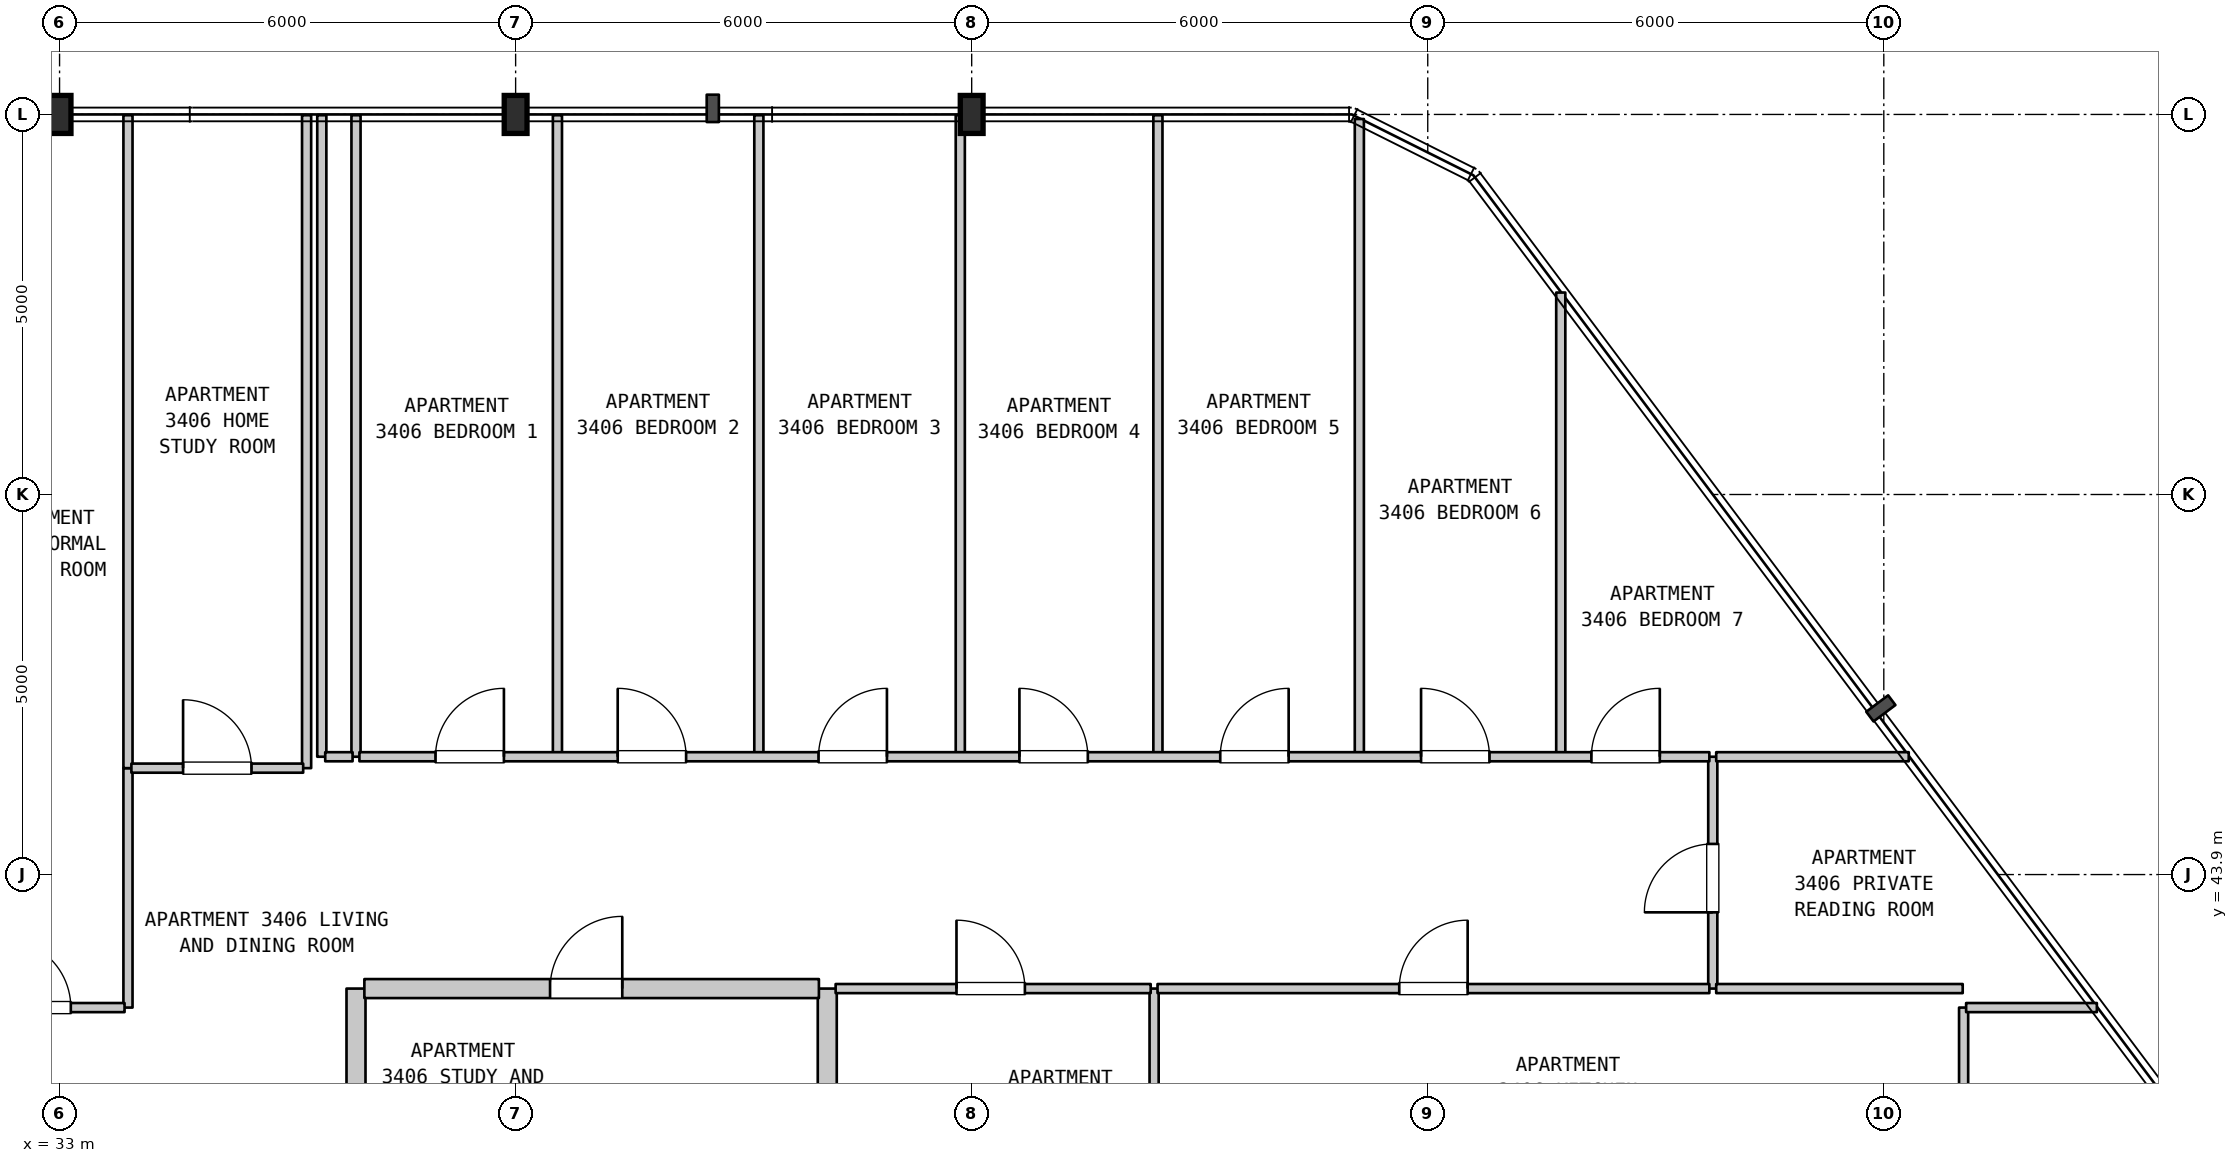
"""IFC4 building model, lengths in metres.
Left out: names, types, materials, properties, quantities, classifications, styles, units other than length and angle.
Written with IfcOpenShell. Run it as: python <this file> out.ifc"""

import sys

from ifc_helpers import new_model, si_unit, direction, frame, frame_2d, origin, origin_2d, place, context, subcontext, project, spatial, rectangle, i_section, extrude, element, fill, save


model = new_model("IFC4")
c1 = context("Model", 3, precision=1e-05, world=origin(), true_north=direction((0.0, 1.0)))
c2 = subcontext(c1, "Body", "Model", "MODEL_VIEW")
j1 = project(units=[si_unit("LENGTHUNIT", "METRE"), si_unit("PLANEANGLEUNIT", "RADIAN")], contexts=[c1])
p1 = place(None, origin())
s1 = spatial("IfcSite", under=j1, at=p1, CompositionType="ELEMENT")
p2 = place(p1, origin())
s2 = spatial("IfcBuilding", under=s1, at=p2, CompositionType="ELEMENT")
p3 = place(p2, frame((0.0, 0.0, 140.9)))
s3 = spatial("IfcBuildingStorey", under=s2, at=p3, CompositionType="ELEMENT", Elevation=140.9)
for number, where, z_axis, x_axis in (
    (1, (33.0, 53.9, 0.0), (0.0, 0.0, 1.0), (1.0, 0.0, 0.0)),
    (2, (39.0, 53.9, 0.0), (0.0, 0.0, 1.0), (1.0, 0.0, 0.0)),
    (3, (45.0, 53.9, 0.0), (0.0, 0.0, 1.0), (1.0, 0.0, 0.0)),
):
    element("IfcColumn", number, at=place(p3, frame(where, z_axis=z_axis, x_axis=x_axis)), inside=s3, PredefinedType="COLUMN", context=c2, shape_type="SweptSolid", body=[
        extrude(i_section(OverallWidth=0.3, OverallDepth=0.5, WebThickness=0.014, FlangeThickness=0.028, FilletRadius=0.027, at=origin_2d()), origin(), (0.0, 0.0, 1.0), 3.7),
    ])
p4 = place(p3, frame((33.9, 42.15, 0.0), z_axis=(0.0, 0.0, 1.0), x_axis=(0.0, 1.0, 0.0)))
e4 = element("IfcWall", 4, at=p4, inside=s3, PredefinedType="PARTITIONING", context=c2, shape_type="SweptSolid", body=[
    extrude(rectangle(XDim=3.15, YDim=0.12, at=frame_2d((1.575, 0.0))), origin(), (0.0, 0.0, 1.0), 3.385),
])
for number, where, z_axis, x_axis in (
    (5, (33.9, 45.3, 0.0), (0.0, 0.0, 1.0), (0.0, 1.0, 0.0)),
    (6, (36.25, 45.3, 0.0), (0.0, 0.0, 1.0), (0.0, 1.0, 0.0)),
):
    element("IfcWall", number, at=place(p3, frame(where, z_axis=z_axis, x_axis=x_axis)), inside=s3, PredefinedType="PARTITIONING", context=c2, shape_type="SweptSolid", body=[
        extrude(rectangle(XDim=8.59, YDim=0.12, at=frame_2d((4.295, 0.0))), origin(), (0.0, 0.0, 1.0), 3.385),
    ])
p5 = place(p3, frame((36.45, 45.45, 0.0), z_axis=(0.0, 0.0, 1.0), x_axis=(0.0, 1.0, 0.0)))
e7 = element("IfcWall", 7, at=p5, inside=s3, PredefinedType="PARTITIONING", context=c2, shape_type="SweptSolid", body=[
    extrude(rectangle(XDim=8.44, YDim=0.12, at=frame_2d((4.22, 0.0))), origin(), (0.0, 0.0, 1.0), 3.385),
])
p6 = place(p3, frame((36.9, 40.1, 0.0), z_axis=(0.0, 0.0, 1.0), x_axis=(0.0, 1.0, 0.0)))
e8 = element("IfcWall", 8, at=p6, inside=s3, PredefinedType="STANDARD", context=c2, shape_type="SweptSolid", body=[
    extrude(rectangle(XDim=2.3, YDim=0.25, at=frame_2d((1.15, 0.0))), origin(), (0.0, 0.0, 1.0), 3.385),
])
for number, where, z_axis, x_axis in (
    (9, (36.9, 45.45, 0.0), (0.0, 0.0, 1.0), (0.0, 1.0, 0.0)),
    (10, (39.55, 45.45, 0.0), (0.0, 0.0, 1.0), (0.0, 1.0, 0.0)),
    (11, (42.2, 45.45, 0.0), (0.0, 0.0, 1.0), (0.0, 1.0, 0.0)),
):
    element("IfcWall", number, at=place(p3, frame(where, z_axis=z_axis, x_axis=x_axis)), inside=s3, PredefinedType="PARTITIONING", context=c2, shape_type="SweptSolid", body=[
        extrude(rectangle(XDim=8.44, YDim=0.12, at=frame_2d((4.22, 0.0))), origin(), (0.0, 0.0, 1.0), 3.385),
    ])
p7 = place(p3, frame((43.1, 40.1, 0.0), z_axis=(0.0, 0.0, 1.0), x_axis=(0.0, 1.0, 0.0)))
e12 = element("IfcWall", 12, at=p7, inside=s3, PredefinedType="STANDARD", context=c2, shape_type="SweptSolid", body=[
    extrude(rectangle(XDim=2.3, YDim=0.25, at=frame_2d((1.15, 0.0))), origin(), (0.0, 0.0, 1.0), 3.385),
])
p8 = place(p3, frame((44.85, 45.45, 0.0), z_axis=(0.0, 0.0, 1.0), x_axis=(0.0, 1.0, 0.0)))
e13 = element("IfcWall", 13, at=p8, inside=s3, PredefinedType="PARTITIONING", context=c2, shape_type="SweptSolid", body=[
    extrude(rectangle(XDim=8.44, YDim=0.12, at=frame_2d((4.22, 0.0))), origin(), (0.0, 0.0, 1.0), 3.385),
])
p9 = place(p3, frame((47.4, 40.1, 0.0), z_axis=(0.0, 0.0, 1.0), x_axis=(0.0, 1.0, 0.0)))
e14 = element("IfcWall", 14, at=p9, inside=s3, PredefinedType="PARTITIONING", context=c2, shape_type="SweptSolid", body=[
    extrude(rectangle(XDim=2.3, YDim=0.12, at=frame_2d((1.15, 0.0))), origin(), (0.0, 0.0, 1.0), 3.385),
])
p10 = place(p3, frame((47.45, 45.45, 0.0), z_axis=(0.0, 0.0, 1.0), x_axis=(0.0, 1.0, 0.0)))
e15 = element("IfcWall", 15, at=p10, inside=s3, PredefinedType="PARTITIONING", context=c2, shape_type="SweptSolid", body=[
    extrude(rectangle(XDim=8.44, YDim=0.12, at=frame_2d((4.22, 0.0))), origin(), (0.0, 0.0, 1.0), 3.385),
])
p11 = place(p3, frame((50.1, 45.45, 0.0), z_axis=(0.0, 0.0, 1.0), x_axis=(0.0, 1.0, 0.0)))
e16 = element("IfcWall", 16, at=p11, inside=s3, PredefinedType="PARTITIONING", context=c2, shape_type="SweptSolid", body=[
    extrude(rectangle(XDim=8.39, YDim=0.12, at=frame_2d((4.195, 0.0))), origin(), (0.0, 0.0, 1.0), 3.385),
])
p12 = place(p3, frame((52.75, 45.45, 0.0), z_axis=(0.0, 0.0, 1.0), x_axis=(0.0, 1.0, 0.0)))
e17 = element("IfcWall", 17, at=p12, inside=s3, PredefinedType="PARTITIONING", context=c2, shape_type="SweptSolid", body=[
    extrude(rectangle(XDim=6.107, YDim=0.12, at=frame_2d((3.053, 0.0))), origin(), (0.0, 0.0, 1.0), 3.385),
])
p13 = place(p3, frame((54.75, 42.4, 0.0), z_axis=(0.0, 0.0, 1.0), x_axis=(0.0, 1.0, 0.0)))
e18 = element("IfcWall", 18, at=p13, inside=s3, PredefinedType="PARTITIONING", context=c2, shape_type="SweptSolid", body=[
    extrude(rectangle(XDim=3.05, YDim=0.12, at=frame_2d((1.525, 0.0))), origin(), (0.0, 0.0, 1.0), 3.385),
])
p14 = place(p13, frame((1.003, 0.0, 0.0)))
e19 = element("IfcOpeningElement", 19, at=p14, cuts=e18, PredefinedType="OPENING", context=c2, shape_type="SweptSolid", body=[
    extrude(rectangle(XDim=0.9, YDim=2.15, at=frame_2d((0.45, 1.075))), frame((0.0, 0.07, 0.0), z_axis=(0.0, -1.0, 0.0), x_axis=(1.0, 0.0, 0.0)), (0.0, 0.0, 1.0), 0.14),
])
p15 = place(p3, frame((58.05, 40.1, 0.0), z_axis=(0.0, 0.0, 1.0), x_axis=(0.0, 1.0, 0.0)))
e20 = element("IfcWall", 20, at=p15, inside=s3, PredefinedType="PARTITIONING", context=c2, shape_type="SweptSolid", body=[
    extrude(rectangle(XDim=2.05, YDim=0.12, at=frame_2d((1.025, 0.0))), origin(), (0.0, 0.0, 1.0), 3.385),
])
p16 = place(p3, frame((31.695, 42.15, 0.0), z_axis=(0.0, 0.0, 1.0), x_axis=(1.0, 0.0, 0.0)))
e21 = element("IfcWall", 21, at=p16, inside=s3, PredefinedType="PARTITIONING", context=c2, shape_type="SweptSolid", body=[
    extrude(rectangle(XDim=2.16, YDim=0.12, at=frame_2d((1.08, 0.0))), origin(), (0.0, 0.0, 1.0), 3.385),
])
p17 = place(p16, frame((0.553, 0.0, 0.0)))
e22 = element("IfcOpeningElement", 22, at=p17, cuts=e21, PredefinedType="OPENING", context=c2, shape_type="SweptSolid", body=[
    extrude(rectangle(XDim=0.9, YDim=2.15, at=frame_2d((0.45, 1.075))), frame((0.0, 0.07, 0.0), z_axis=(0.0, -1.0, 0.0), x_axis=(1.0, 0.0, 0.0)), (0.0, 0.0, 1.0), 0.14),
])
p18 = place(p3, frame((58.083, 42.15, 0.0), z_axis=(0.0, 0.0, 1.0), x_axis=(1.0, 0.0, 0.0)))
e23 = element("IfcWall", 23, at=p18, inside=s3, PredefinedType="PARTITIONING", context=c2, shape_type="SweptSolid", body=[
    extrude(rectangle(XDim=1.72, YDim=0.12, at=frame_2d((0.86, 0.0))), origin(), (0.0, 0.0, 1.0), 3.385),
])
p19 = place(p3, frame((37.01, 42.4, 0.0), z_axis=(0.0, 0.0, 1.0), x_axis=(1.0, 0.0, 0.0)))
e24 = element("IfcWall", 24, at=p19, inside=s3, PredefinedType="STANDARD", context=c2, shape_type="SweptSolid", body=[
    extrude(rectangle(XDim=5.98, YDim=0.25, at=frame_2d((2.99, 0.0))), origin(), (0.0, 0.0, 1.0), 3.385),
])
p20 = place(p19, frame((2.443, 0.0, 0.0)))
e25 = element("IfcOpeningElement", 25, at=p20, cuts=e24, PredefinedType="OPENING", context=c2, shape_type="SweptSolid", body=[
    extrude(rectangle(XDim=0.95, YDim=2.15, at=frame_2d((0.475, 1.075))), frame((0.0, 0.135, 0.0), z_axis=(0.0, -1.0, 0.0), x_axis=(1.0, 0.0, 0.0)), (0.0, 0.0, 1.0), 0.27),
])
p21 = place(p3, frame((43.21, 42.4, 0.0), z_axis=(0.0, 0.0, 1.0), x_axis=(1.0, 0.0, 0.0)))
e26 = element("IfcWall", 26, at=p21, inside=s3, PredefinedType="PARTITIONING", context=c2, shape_type="SweptSolid", body=[
    extrude(rectangle(XDim=4.145, YDim=0.12, at=frame_2d((2.073, 0.0))), origin(), (0.0, 0.0, 1.0), 3.385),
])
p22 = place(p21, frame((1.59, 0.0, 0.0)))
e27 = element("IfcOpeningElement", 27, at=p22, cuts=e26, PredefinedType="OPENING", context=c2, shape_type="SweptSolid", body=[
    extrude(rectangle(XDim=0.9, YDim=2.1, at=frame_2d((0.45, 1.05))), frame((0.0, 0.07, 0.0), z_axis=(0.0, -1.0, 0.0), x_axis=(1.0, 0.0, 0.0)), (0.0, 0.0, 1.0), 0.14),
])
p23 = place(p3, frame((47.445, 42.4, 0.0), z_axis=(0.0, 0.0, 1.0), x_axis=(1.0, 0.0, 0.0)))
e28 = element("IfcWall", 28, at=p23, inside=s3, PredefinedType="PARTITIONING", context=c2, shape_type="SweptSolid", body=[
    extrude(rectangle(XDim=7.26, YDim=0.12, at=frame_2d((3.63, 0.0))), origin(), (0.0, 0.0, 1.0), 3.385),
])
p24 = place(p23, frame((3.18, 0.0, 0.0)))
e29 = element("IfcOpeningElement", 29, at=p24, cuts=e28, PredefinedType="OPENING", context=c2, shape_type="SweptSolid", body=[
    extrude(rectangle(XDim=0.9, YDim=2.15, at=frame_2d((0.45, 1.075))), frame((0.0, 0.07, 0.0), z_axis=(0.0, -1.0, 0.0), x_axis=(1.0, 0.0, 0.0)), (0.0, 0.0, 1.0), 0.14),
])
p25 = place(p3, frame((54.795, 42.4, 0.0), z_axis=(0.0, 0.0, 1.0), x_axis=(1.0, 0.0, 0.0)))
e30 = element("IfcWall", 30, at=p25, inside=s3, PredefinedType="PARTITIONING", context=c2, shape_type="SweptSolid", body=[
    extrude(rectangle(XDim=3.243, YDim=0.12, at=frame_2d((1.622, 0.0))), origin(), (0.0, 0.0, 1.0), 3.385),
])
p26 = place(p3, frame((33.945, 45.3, 0.0), z_axis=(0.0, 0.0, 1.0), x_axis=(1.0, 0.0, 0.0)))
e31 = element("IfcWall", 31, at=p26, inside=s3, PredefinedType="PARTITIONING", context=c2, shape_type="SweptSolid", body=[
    extrude(rectangle(XDim=2.26, YDim=0.12, at=frame_2d((1.13, 0.0))), origin(), (0.0, 0.0, 1.0), 3.385),
])
p27 = place(p26, frame((0.68, 0.0, 0.0)))
e32 = element("IfcOpeningElement", 32, at=p27, cuts=e31, PredefinedType="OPENING", context=c2, shape_type="SweptSolid", body=[
    extrude(rectangle(XDim=0.9, YDim=2.15, at=frame_2d((0.45, 1.075))), frame((0.0, 0.07, 0.0), z_axis=(0.0, -1.0, 0.0), x_axis=(1.0, 0.0, 0.0)), (0.0, 0.0, 1.0), 0.14),
])
p28 = place(p3, frame((36.495, 45.45, 0.0), z_axis=(0.0, 0.0, 1.0), x_axis=(1.0, 0.0, 0.0)))
e33 = element("IfcWall", 33, at=p28, inside=s3, PredefinedType="PARTITIONING", context=c2, shape_type="SweptSolid", body=[
    extrude(rectangle(XDim=0.36, YDim=0.12, at=frame_2d((0.18, 0.0))), origin(), (0.0, 0.0, 1.0), 3.385),
])
p29 = place(p3, frame((36.945, 45.45, 0.0), z_axis=(0.0, 0.0, 1.0), x_axis=(1.0, 0.0, 0.0)))
e34 = element("IfcWall", 34, at=p29, inside=s3, PredefinedType="PARTITIONING", context=c2, shape_type="SweptSolid", body=[
    extrude(rectangle(XDim=17.76, YDim=0.12, at=frame_2d((8.88, 0.0))), origin(), (0.0, 0.0, 1.0), 3.385),
])
p30 = place(p29, frame((1.001, 0.0, 0.0)))
e35 = element("IfcOpeningElement", 35, at=p30, cuts=e34, PredefinedType="OPENING", context=c2, shape_type="SweptSolid", body=[
    extrude(rectangle(XDim=0.9, YDim=2.15, at=frame_2d((0.45, 1.075))), frame((0.0, 0.07, 0.0), z_axis=(0.0, -1.0, 0.0), x_axis=(1.0, 0.0, 0.0)), (0.0, 0.0, 1.0), 0.14),
])
p31 = place(p29, frame((3.398, 0.0, 0.0)))
e36 = element("IfcOpeningElement", 36, at=p31, cuts=e34, PredefinedType="OPENING", context=c2, shape_type="SweptSolid", body=[
    extrude(rectangle(XDim=0.9, YDim=2.15, at=frame_2d((0.45, 1.075))), frame((0.0, 0.07, 0.0), z_axis=(0.0, -1.0, 0.0), x_axis=(1.0, 0.0, 0.0)), (0.0, 0.0, 1.0), 0.14),
])
p32 = place(p29, frame((6.04, 0.0, 0.0)))
e37 = element("IfcOpeningElement", 37, at=p32, cuts=e34, PredefinedType="OPENING", context=c2, shape_type="SweptSolid", body=[
    extrude(rectangle(XDim=0.9, YDim=2.15, at=frame_2d((0.45, 1.075))), frame((0.0, 0.07, 0.0), z_axis=(0.0, -1.0, 0.0), x_axis=(1.0, 0.0, 0.0)), (0.0, 0.0, 1.0), 0.14),
])
p33 = place(p29, frame((8.683, 0.0, 0.0)))
e38 = element("IfcOpeningElement", 38, at=p33, cuts=e34, PredefinedType="OPENING", context=c2, shape_type="SweptSolid", body=[
    extrude(rectangle(XDim=0.9, YDim=2.15, at=frame_2d((0.45, 1.075))), frame((0.0, 0.07, 0.0), z_axis=(0.0, -1.0, 0.0), x_axis=(1.0, 0.0, 0.0)), (0.0, 0.0, 1.0), 0.14),
])
p34 = place(p29, frame((11.325, 0.0, 0.0)))
e39 = element("IfcOpeningElement", 39, at=p34, cuts=e34, PredefinedType="OPENING", context=c2, shape_type="SweptSolid", body=[
    extrude(rectangle(XDim=0.9, YDim=2.15, at=frame_2d((0.45, 1.075))), frame((0.0, 0.07, 0.0), z_axis=(0.0, -1.0, 0.0), x_axis=(1.0, 0.0, 0.0)), (0.0, 0.0, 1.0), 0.14),
])
p35 = place(p29, frame((13.967, 0.0, 0.0)))
e40 = element("IfcOpeningElement", 40, at=p35, cuts=e34, PredefinedType="OPENING", context=c2, shape_type="SweptSolid", body=[
    extrude(rectangle(XDim=0.9, YDim=2.15, at=frame_2d((0.45, 1.075))), frame((0.0, 0.07, 0.0), z_axis=(0.0, -1.0, 0.0), x_axis=(1.0, 0.0, 0.0)), (0.0, 0.0, 1.0), 0.14),
])
p36 = place(p29, frame((16.208, 0.0, 0.0)))
e41 = element("IfcOpeningElement", 41, at=p36, cuts=e34, PredefinedType="OPENING", context=c2, shape_type="SweptSolid", body=[
    extrude(rectangle(XDim=0.9, YDim=2.15, at=frame_2d((0.45, 1.075))), frame((0.0, 0.07, 0.0), z_axis=(0.0, -1.0, 0.0), x_axis=(1.0, 0.0, 0.0)), (0.0, 0.0, 1.0), 0.14),
])
p37 = place(p3, frame((54.795, 45.45, 0.0), z_axis=(0.0, 0.0, 1.0), x_axis=(1.0, 0.0, 0.0)))
e42 = element("IfcWall", 42, at=p37, inside=s3, PredefinedType="PARTITIONING", context=c2, shape_type="SweptSolid", body=[
    extrude(rectangle(XDim=2.533, YDim=0.12, at=frame_2d((1.267, 0.0))), origin(), (0.0, 0.0, 1.0), 3.385),
])
p38 = place(p14, origin())
e43 = element("IfcDoor", 43, at=p38, inside=s3, OperationType="SINGLE_SWING_LEFT", PredefinedType="DOOR", context=c2, shape_type="SweptSolid", body=[
    extrude(rectangle(XDim=0.9, YDim=2.15, at=frame_2d((0.45, 1.075))), frame((0.0, 0.025, 0.0), z_axis=(0.0, -1.0, 0.0), x_axis=(1.0, 0.0, 0.0)), (0.0, 0.0, 1.0), 0.05),
])
fill(e19, e43)
p39 = place(p17, origin())
e44 = element("IfcDoor", 44, at=p39, inside=s3, OperationType="SINGLE_SWING_LEFT", PredefinedType="DOOR", context=c2, shape_type="SweptSolid", body=[
    extrude(rectangle(XDim=0.9, YDim=2.15, at=frame_2d((0.45, 1.075))), frame((0.0, 0.025, 0.0), z_axis=(0.0, -1.0, 0.0), x_axis=(1.0, 0.0, 0.0)), (0.0, 0.0, 1.0), 0.05),
])
fill(e22, e44)
p40 = place(p20, origin())
e45 = element("IfcDoor", 45, at=p40, inside=s3, OperationType="SINGLE_SWING_RIGHT", PredefinedType="DOOR", context=c2, shape_type="SweptSolid", body=[
    extrude(rectangle(XDim=0.95, YDim=2.15, at=frame_2d((0.475, 1.075))), frame((0.0, 0.025, 0.0), z_axis=(0.0, -1.0, 0.0), x_axis=(1.0, 0.0, 0.0)), (0.0, 0.0, 1.0), 0.05),
])
fill(e25, e45)
p41 = place(p22, origin())
e46 = element("IfcDoor", 46, at=p41, inside=s3, OperationType="SINGLE_SWING_LEFT", PredefinedType="DOOR", context=c2, shape_type="SweptSolid", body=[
    extrude(rectangle(XDim=0.9, YDim=2.1, at=frame_2d((0.45, 1.05))), frame((0.0, 0.025, 0.0), z_axis=(0.0, -1.0, 0.0), x_axis=(1.0, 0.0, 0.0)), (0.0, 0.0, 1.0), 0.05),
])
fill(e27, e46)
p42 = place(p24, origin())
e47 = element("IfcDoor", 47, at=p42, inside=s3, OperationType="SINGLE_SWING_RIGHT", PredefinedType="DOOR", context=c2, shape_type="SweptSolid", body=[
    extrude(rectangle(XDim=0.9, YDim=2.15, at=frame_2d((0.45, 1.075))), frame((0.0, 0.025, 0.0), z_axis=(0.0, -1.0, 0.0), x_axis=(1.0, 0.0, 0.0)), (0.0, 0.0, 1.0), 0.05),
])
fill(e29, e47)
p43 = place(p27, origin())
e48 = element("IfcDoor", 48, at=p43, inside=s3, OperationType="SINGLE_SWING_LEFT", PredefinedType="DOOR", context=c2, shape_type="SweptSolid", body=[
    extrude(rectangle(XDim=0.9, YDim=2.15, at=frame_2d((0.45, 1.075))), frame((0.0, 0.025, 0.0), z_axis=(0.0, -1.0, 0.0), x_axis=(1.0, 0.0, 0.0)), (0.0, 0.0, 1.0), 0.05),
])
fill(e32, e48)
p44 = place(p30, origin())
e49 = element("IfcDoor", 49, at=p44, inside=s3, OperationType="SINGLE_SWING_RIGHT", PredefinedType="DOOR", context=c2, shape_type="SweptSolid", body=[
    extrude(rectangle(XDim=0.9, YDim=2.15, at=frame_2d((0.45, 1.075))), frame((0.0, 0.025, 0.0), z_axis=(0.0, -1.0, 0.0), x_axis=(1.0, 0.0, 0.0)), (0.0, 0.0, 1.0), 0.05),
])
fill(e35, e49)
p45 = place(p31, origin())
e50 = element("IfcDoor", 50, at=p45, inside=s3, OperationType="SINGLE_SWING_LEFT", PredefinedType="DOOR", context=c2, shape_type="SweptSolid", body=[
    extrude(rectangle(XDim=0.9, YDim=2.15, at=frame_2d((0.45, 1.075))), frame((0.0, 0.025, 0.0), z_axis=(0.0, -1.0, 0.0), x_axis=(1.0, 0.0, 0.0)), (0.0, 0.0, 1.0), 0.05),
])
fill(e36, e50)
p46 = place(p32, origin())
e51 = element("IfcDoor", 51, at=p46, inside=s3, OperationType="SINGLE_SWING_RIGHT", PredefinedType="DOOR", context=c2, shape_type="SweptSolid", body=[
    extrude(rectangle(XDim=0.9, YDim=2.15, at=frame_2d((0.45, 1.075))), frame((0.0, 0.025, 0.0), z_axis=(0.0, -1.0, 0.0), x_axis=(1.0, 0.0, 0.0)), (0.0, 0.0, 1.0), 0.05),
])
fill(e37, e51)
p47 = place(p33, origin())
e52 = element("IfcDoor", 52, at=p47, inside=s3, OperationType="SINGLE_SWING_LEFT", PredefinedType="DOOR", context=c2, shape_type="SweptSolid", body=[
    extrude(rectangle(XDim=0.9, YDim=2.15, at=frame_2d((0.45, 1.075))), frame((0.0, 0.025, 0.0), z_axis=(0.0, -1.0, 0.0), x_axis=(1.0, 0.0, 0.0)), (0.0, 0.0, 1.0), 0.05),
])
fill(e38, e52)
p48 = place(p34, origin())
e53 = element("IfcDoor", 53, at=p48, inside=s3, OperationType="SINGLE_SWING_RIGHT", PredefinedType="DOOR", context=c2, shape_type="SweptSolid", body=[
    extrude(rectangle(XDim=0.9, YDim=2.15, at=frame_2d((0.45, 1.075))), frame((0.0, 0.025, 0.0), z_axis=(0.0, -1.0, 0.0), x_axis=(1.0, 0.0, 0.0)), (0.0, 0.0, 1.0), 0.05),
])
fill(e39, e53)
p49 = place(p35, origin())
e54 = element("IfcDoor", 54, at=p49, inside=s3, OperationType="SINGLE_SWING_LEFT", PredefinedType="DOOR", context=c2, shape_type="SweptSolid", body=[
    extrude(rectangle(XDim=0.9, YDim=2.15, at=frame_2d((0.45, 1.075))), frame((0.0, 0.025, 0.0), z_axis=(0.0, -1.0, 0.0), x_axis=(1.0, 0.0, 0.0)), (0.0, 0.0, 1.0), 0.05),
])
fill(e40, e54)
p50 = place(p36, origin())
e55 = element("IfcDoor", 55, at=p50, inside=s3, OperationType="SINGLE_SWING_RIGHT", PredefinedType="DOOR", context=c2, shape_type="SweptSolid", body=[
    extrude(rectangle(XDim=0.9, YDim=2.15, at=frame_2d((0.45, 1.075))), frame((0.0, 0.025, 0.0), z_axis=(0.0, -1.0, 0.0), x_axis=(1.0, 0.0, 0.0)), (0.0, 0.0, 1.0), 0.05),
])
fill(e41, e55)
save(model, sys.argv[1])
